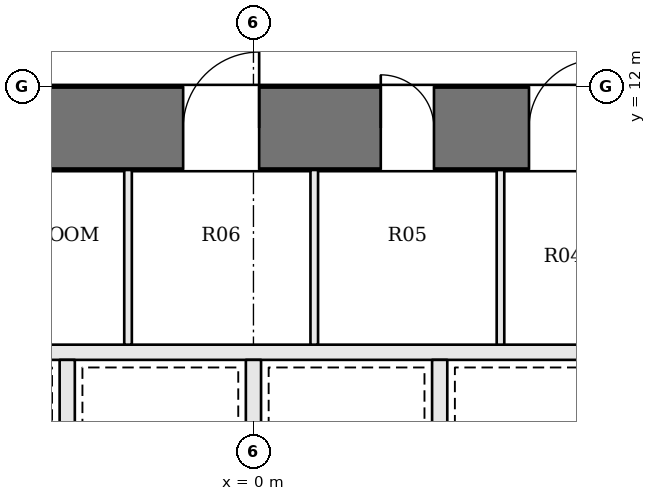
"""IFC4 building model, lengths in metres.
Left out: names, types, materials, properties, quantities, classifications, styles, units other than length and angle.
Written with IfcOpenShell. Run it as: python <this file> out.ifc"""

import sys

from ifc_helpers import new_model, si_unit, direction, frame, frame_2d, origin, place, context, subcontext, project, spatial, rectangle, extrude, element, fill, save


model = new_model("IFC4")
c1 = context("Model", 3, precision=1e-05, world=origin(), true_north=direction((0.0, 1.0)))
c2 = subcontext(c1, "Body", "Model", "MODEL_VIEW")
j1 = project(units=[si_unit("LENGTHUNIT", "METRE"), si_unit("PLANEANGLEUNIT", "RADIAN")], contexts=[c1])
p1 = place(None, origin())
s1 = spatial("IfcSite", under=j1, at=p1, CompositionType="ELEMENT")
p2 = place(p1, origin())
s2 = spatial("IfcBuilding", under=s1, at=p2, CompositionType="ELEMENT")
p3 = place(p2, frame((0.0, 0.0, 153.9)))
s3 = spatial("IfcBuildingStorey", under=s2, at=p3, CompositionType="ELEMENT", Elevation=153.9)
p4 = place(p3, frame((-13.0, 11.45, 0.0), z_axis=(0.0, 0.0, 1.0), x_axis=(1.0, 0.0, 0.0)))
e1 = element("IfcWall", 1, at=p4, inside=s3, PredefinedType="SHEAR", context=c2, shape_type="SweptSolid", body=[
    extrude(rectangle(XDim=26.0, YDim=1.1, at=frame_2d((13.0, 0.0))), origin(), (0.0, 0.0, 1.0), 3.9),
])
p5 = place(p4, frame((9.375, 0.0, 0.0)))
e2 = element("IfcOpeningElement", 2, at=p5, cuts=e1, PredefinedType="OPENING", context=c2, shape_type="SweptSolid", body=[
    extrude(rectangle(XDim=0.7, YDim=2.1, at=frame_2d((0.35, 1.05))), frame((0.0, 0.56, 0.0), z_axis=(0.0, -1.0, 0.0), x_axis=(1.0, 0.0, 0.0)), (0.0, 0.0, 1.0), 1.12),
])
p6 = place(p4, frame((12.075, 0.0, 0.0)))
e3 = element("IfcOpeningElement", 3, at=p6, cuts=e1, PredefinedType="OPENING", context=c2, shape_type="SweptSolid", body=[
    extrude(rectangle(XDim=1.0, YDim=2.1, at=frame_2d((0.5, 1.05))), frame((0.0, 0.56, 0.0), z_axis=(0.0, -1.0, 0.0), x_axis=(1.0, 0.0, 0.0)), (0.0, 0.0, 1.0), 1.12),
])
p7 = place(p4, frame((14.675, 0.0, 0.0)))
e4 = element("IfcOpeningElement", 4, at=p7, cuts=e1, PredefinedType="OPENING", context=c2, shape_type="SweptSolid", body=[
    extrude(rectangle(XDim=0.7, YDim=2.1, at=frame_2d((0.35, 1.05))), frame((0.0, 0.56, 0.0), z_axis=(0.0, -1.0, 0.0), x_axis=(1.0, 0.0, 0.0)), (0.0, 0.0, 1.0), 1.12),
])
p8 = place(p4, frame((16.625, 0.0, 0.0)))
e5 = element("IfcOpeningElement", 5, at=p8, cuts=e1, PredefinedType="OPENING", context=c2, shape_type="SweptSolid", body=[
    extrude(rectangle(XDim=0.9, YDim=2.1, at=frame_2d((0.45, 1.05))), frame((0.0, 0.56, 0.0), z_axis=(0.0, -1.0, 0.0), x_axis=(1.0, 0.0, 0.0)), (0.0, 0.0, 1.0), 1.12),
])
p9 = place(p3, frame((-4.9, 8.5, 0.0), z_axis=(0.0, 0.0, 1.0), x_axis=(1.0, 0.0, 0.0)))
e6 = element("IfcWall", 6, at=p9, inside=s3, PredefinedType="SOLIDWALL", context=c2, shape_type="SweptSolid", body=[
    extrude(rectangle(XDim=9.8, YDim=0.2, at=frame_2d((4.9, 0.0))), origin(), (0.0, 0.0, 1.0), 3.7),
])
for number, where, z_axis, x_axis in (
    (7, (-2.45, 6.2, 0.0), (0.0, 0.0, 1.0), (0.0, 1.0, 0.0)),
    (8, (0.0, 6.2, 0.0), (0.0, 0.0, 1.0), (0.0, 1.0, 0.0)),
    (9, (2.45, 6.2, 0.0), (0.0, 0.0, 1.0), (0.0, 1.0, 0.0)),
):
    element("IfcWall", number, at=place(p3, frame(where, z_axis=z_axis, x_axis=x_axis)), inside=s3, PredefinedType="SOLIDWALL", context=c2, shape_type="SweptSolid", body=[
        extrude(rectangle(XDim=2.2, YDim=0.2, at=frame_2d((1.1, 0.0))), origin(), (0.0, 0.0, 1.0), 3.7),
    ])
for number, where, z_axis, x_axis in (
    (10, (-1.65, 8.6, 0.0), (0.0, 0.0, 1.0), (0.0, 1.0, 0.0)),
    (11, (0.8, 8.6, 0.0), (0.0, 0.0, 1.0), (0.0, 1.0, 0.0)),
    (12, (3.25, 8.6, 0.0), (0.0, 0.0, 1.0), (0.0, 1.0, 0.0)),
):
    element("IfcWall", number, at=place(p3, frame(where, z_axis=z_axis, x_axis=x_axis)), inside=s3, PredefinedType="PARTITIONING", context=c2, shape_type="SweptSolid", body=[
        extrude(rectangle(XDim=2.3, YDim=0.1, at=frame_2d((1.15, 0.0))), origin(), (0.0, 0.0, 1.0), 3.7),
    ])
p10 = place(p6, origin())
e13 = element("IfcDoor", 13, at=p10, inside=s3, OperationType="SINGLE_SWING_RIGHT", PredefinedType="DOOR", context=c2, shape_type="SweptSolid", body=[
    extrude(rectangle(XDim=1.0, YDim=2.1, at=frame_2d((0.5, 1.05))), frame((0.0, 0.025, 0.0), z_axis=(0.0, -1.0, 0.0), x_axis=(1.0, 0.0, 0.0)), (0.0, 0.0, 1.0), 0.05),
])
fill(e3, e13)
p11 = place(p7, origin())
e14 = element("IfcDoor", 14, at=p11, inside=s3, OperationType="SINGLE_SWING_LEFT", PredefinedType="DOOR", context=c2, shape_type="SweptSolid", body=[
    extrude(rectangle(XDim=0.7, YDim=2.1, at=frame_2d((0.35, 1.05))), frame((0.0, 0.025, 0.0), z_axis=(0.0, -1.0, 0.0), x_axis=(1.0, 0.0, 0.0)), (0.0, 0.0, 1.0), 0.05),
])
fill(e4, e14)
p12 = place(p8, origin())
e15 = element("IfcDoor", 15, at=p12, inside=s3, OperationType="SINGLE_SWING_RIGHT", PredefinedType="DOOR", context=c2, shape_type="SweptSolid", body=[
    extrude(rectangle(XDim=0.9, YDim=2.1, at=frame_2d((0.45, 1.05))), frame((0.0, 0.025, 0.0), z_axis=(0.0, -1.0, 0.0), x_axis=(1.0, 0.0, 0.0)), (0.0, 0.0, 1.0), 0.05),
])
fill(e5, e15)
save(model, sys.argv[1])
